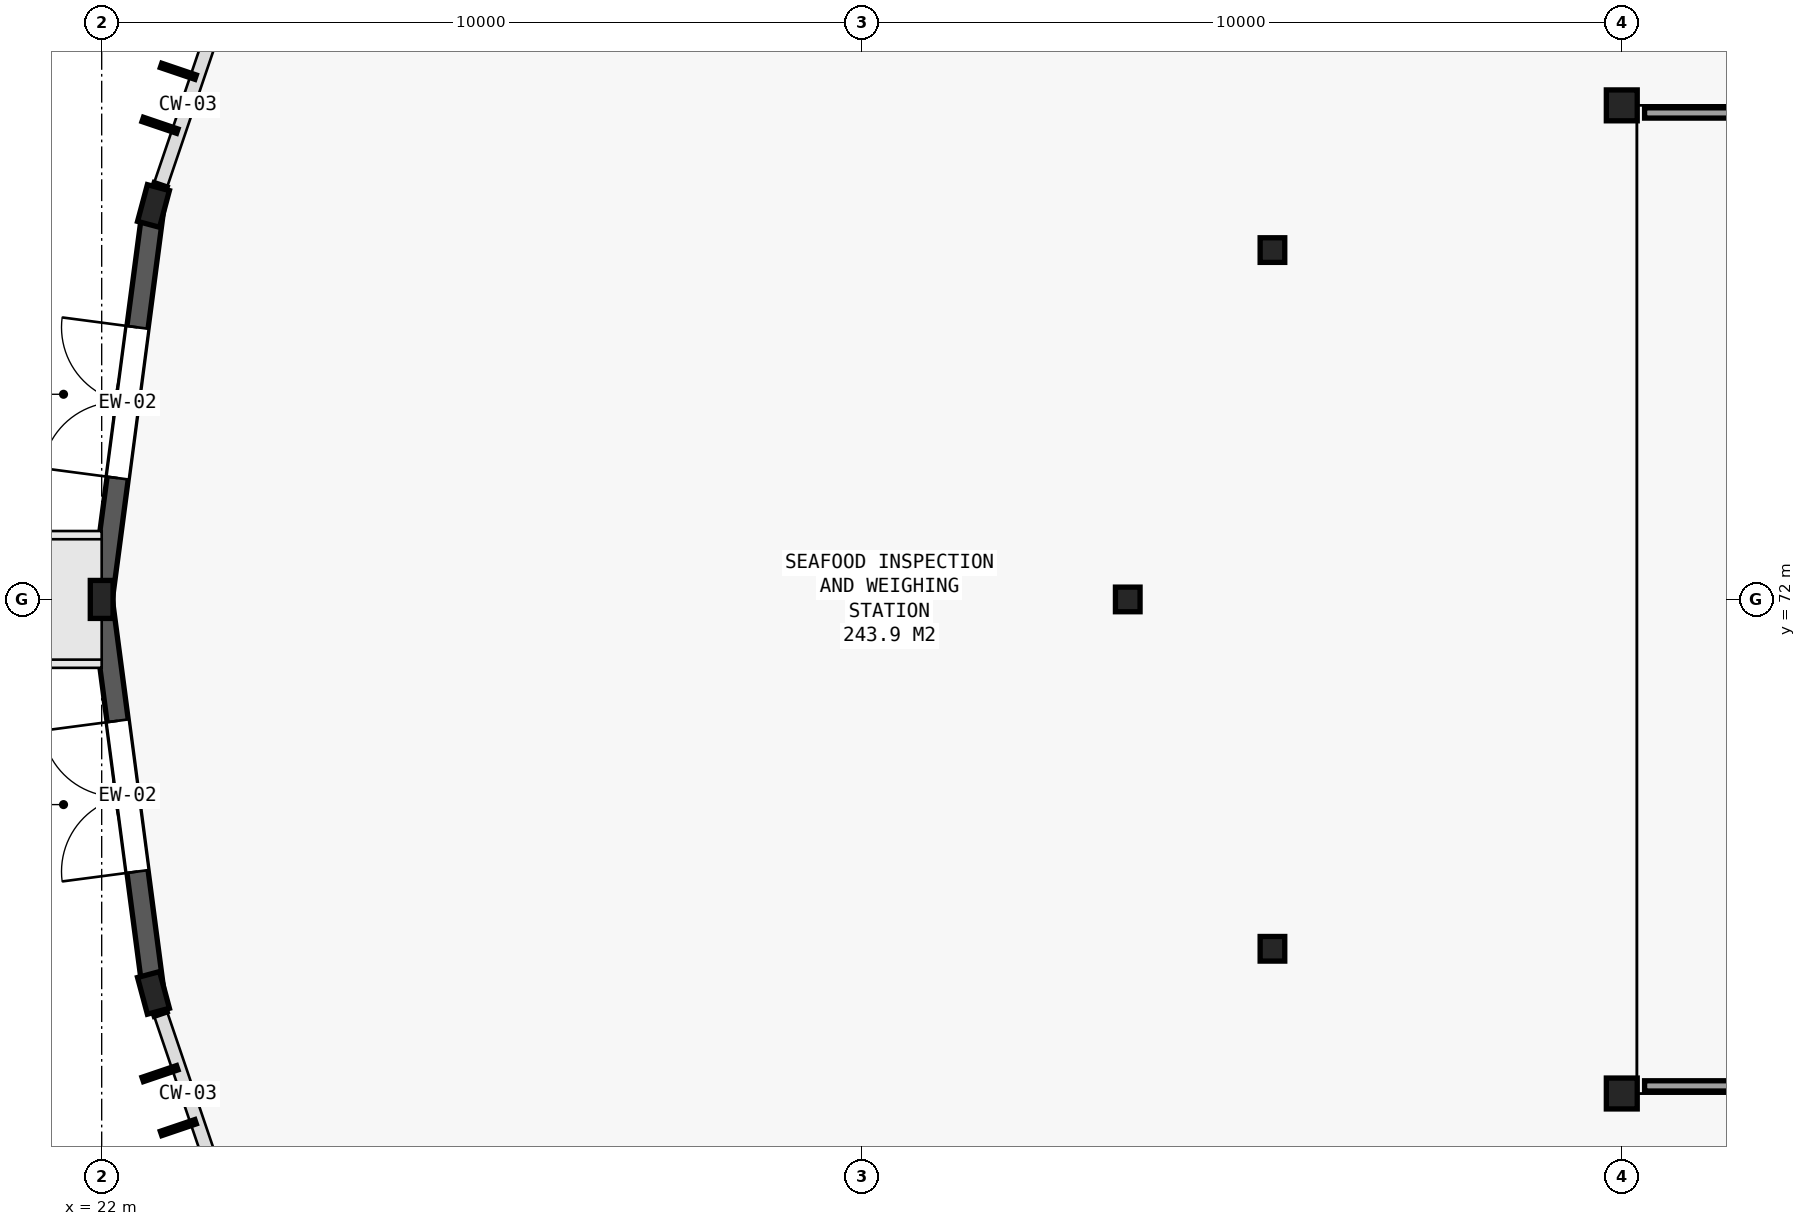
"""IFC4 building model, lengths in metres.
Left out: names, types, materials, properties, quantities, classifications, styles, units other than length and angle.
Written with IfcOpenShell. Run it as: python <this file> out.ifc"""

import sys

from ifc_helpers import new_model, si_unit, direction, frame, frame_2d, origin, origin_2d, place, context, subcontext, project, spatial, rectangle, hollow_circle, i_section, extrude, element, fill, save


model = new_model("IFC4")
c1 = context("Model", 3, precision=1e-05, world=origin(), true_north=direction((0.0, 1.0)))
c2 = subcontext(c1, "Body", "Model", "MODEL_VIEW")
j1 = project(units=[si_unit("LENGTHUNIT", "METRE"), si_unit("PLANEANGLEUNIT", "RADIAN")], contexts=[c1])
p1 = place(None, origin())
s1 = spatial("IfcSite", under=j1, at=p1, CompositionType="ELEMENT")
p2 = place(p1, origin())
s2 = spatial("IfcBuilding", under=s1, at=p2, CompositionType="ELEMENT")
p3 = place(p2, origin())
s3 = spatial("IfcBuildingStorey", under=s2, at=p3, CompositionType="ELEMENT", Elevation=0.0)
for number, where, z_axis, x_axis in (
    (1, (22.681, 77.176, 0.0), (0.0, 0.0, 1.0), (-0.966, 0.259, 0.0)),
    (2, (22.0, 72.0, 0.0), (0.0, 0.0, 1.0), (-1.0, 0.0, 0.0)),
    (3, (22.681, 66.824, 0.0), (0.0, 0.0, 1.0), (-0.966, -0.259, 0.0)),
):
    element("IfcColumn", number, at=place(p3, frame(where, z_axis=z_axis, x_axis=x_axis)), inside=s3, PredefinedType="COLUMN", context=c2, shape_type="SweptSolid", body=[
        extrude(i_section(OverallWidth=0.3, OverallDepth=0.5, WebThickness=0.014, FlangeThickness=0.028, FilletRadius=0.027, at=origin_2d()), origin(), (0.0, 0.0, 1.0), 5.4),
    ])
for number, where, z_axis, x_axis in (
    (4, (42.0, 65.5, 0.0), (0.0, 0.0, 1.0), (1.0, 0.0, 0.0)),
    (5, (42.0, 78.5, 0.0), (0.0, 0.0, 1.0), (1.0, 0.0, 0.0)),
):
    element("IfcColumn", number, at=place(p3, frame(where, z_axis=z_axis, x_axis=x_axis)), inside=s3, PredefinedType="COLUMN", context=c2, shape_type="SweptSolid", body=[
        extrude(hollow_circle(Radius=0.203, WallThickness=0.014, at=origin_2d()), origin(), (0.0, 0.0, 1.0), 5.4),
    ])
for number, where, z_axis, x_axis in (
    (6, (37.404, 76.596, 0.0), (0.0, 0.0, 1.0), (1.0, 0.0, 0.0)),
    (7, (35.5, 72.0, 0.0), (0.0, 0.0, 1.0), (1.0, 0.0, 0.0)),
    (8, (37.404, 67.404, 0.0), (0.0, 0.0, 1.0), (1.0, 0.0, 0.0)),
):
    element("IfcColumn", number, at=place(p3, frame(where, z_axis=z_axis, x_axis=x_axis)), inside=s3, PredefinedType="COLUMN", context=c2, shape_type="SweptSolid", body=[
        extrude(hollow_circle(Radius=0.162, WallThickness=0.01, at=origin_2d()), origin(), (0.0, 0.0, 1.0), 5.4),
    ])
p4 = place(p3, frame((22.0, 72.0, 0.0), z_axis=(0.0, 0.0, 1.0), x_axis=(0.130512574825, 0.991446654043, 0.0)))
e9 = element("IfcWall", 9, at=p4, inside=s3, PredefinedType="SOLIDWALL", context=c2, shape_type="SweptSolid", body=[
    extrude(rectangle(XDim=5.221, YDim=0.28, at=frame_2d((2.61, 0.0))), origin(), (0.0, 0.0, 1.0), 5.1),
])
p5 = place(p4, frame((1.611, 0.0, 0.0)))
e10 = element("IfcOpeningElement", 10, at=p5, cuts=e9, PredefinedType="OPENING", context=c2, shape_type="SweptSolid", body=[
    extrude(rectangle(XDim=2.0, YDim=2.3, at=frame_2d((1.0, 1.15))), frame((0.0, 0.15, 0.0), z_axis=(0.0, -1.0, 0.0), x_axis=(1.0, 0.0, 0.0)), (0.0, 0.0, 1.0), 0.3),
])
p6 = place(p3, frame((22.681, 66.824, 0.0), z_axis=(0.0, 0.0, 1.0), x_axis=(-0.130512574825, 0.991446654043, 0.0)))
e11 = element("IfcWall", 11, at=p6, inside=s3, PredefinedType="SOLIDWALL", context=c2, shape_type="SweptSolid", body=[
    extrude(rectangle(XDim=5.221, YDim=0.28, at=frame_2d((2.61, 0.0))), origin(), (0.0, 0.0, 1.0), 5.1),
])
p7 = place(p6, frame((1.611, 0.0, 0.0)))
e12 = element("IfcOpeningElement", 12, at=p7, cuts=e11, PredefinedType="OPENING", context=c2, shape_type="SweptSolid", body=[
    extrude(rectangle(XDim=2.0, YDim=2.3, at=frame_2d((1.0, 1.15))), frame((0.0, 0.15, 0.0), z_axis=(0.0, -1.0, 0.0), x_axis=(1.0, 0.0, 0.0)), (0.0, 0.0, 1.0), 0.3),
])
for number, where, z_axis, x_axis in (
    (13, (42.3, 78.4, -0.15), (0.0, 0.0, 1.0), (1.0, 0.0, 0.0)),
    (14, (73.0, 65.6, -0.15), (0.0, 0.0, 1.0), (-1.0, 0.0, 0.0)),
):
    element("IfcWall", number, at=place(p3, frame(where, z_axis=z_axis, x_axis=x_axis)), inside=s3, PredefinedType="PARTITIONING", context=c2, shape_type="SweptSolid", body=[
        extrude(rectangle(XDim=30.7, YDim=0.135, at=frame_2d((15.35, 0.0))), origin(), (0.0, 0.0, 1.0), 1.0),
    ])
p8 = place(p5, origin())
e15 = element("IfcDoor", 15, at=p8, inside=s3, OperationType="DOUBLE_DOOR_SINGLE_SWING", PredefinedType="DOOR", context=c2, shape_type="SweptSolid", body=[
    extrude(rectangle(XDim=2.0, YDim=2.3, at=frame_2d((1.0, 1.15))), frame((0.0, 0.025, 0.0), z_axis=(0.0, -1.0, 0.0), x_axis=(1.0, 0.0, 0.0)), (0.0, 0.0, 1.0), 0.05),
])
fill(e10, e15)
p9 = place(p7, origin())
e16 = element("IfcDoor", 16, at=p9, inside=s3, OperationType="DOUBLE_DOOR_SINGLE_SWING", PredefinedType="DOOR", context=c2, shape_type="SweptSolid", body=[
    extrude(rectangle(XDim=2.0, YDim=2.3, at=frame_2d((1.0, 1.15))), frame((0.0, 0.025, 0.0), z_axis=(0.0, -1.0, 0.0), x_axis=(1.0, 0.0, 0.0)), (0.0, 0.0, 1.0), 0.05),
])
fill(e12, e16)
save(model, sys.argv[1])
